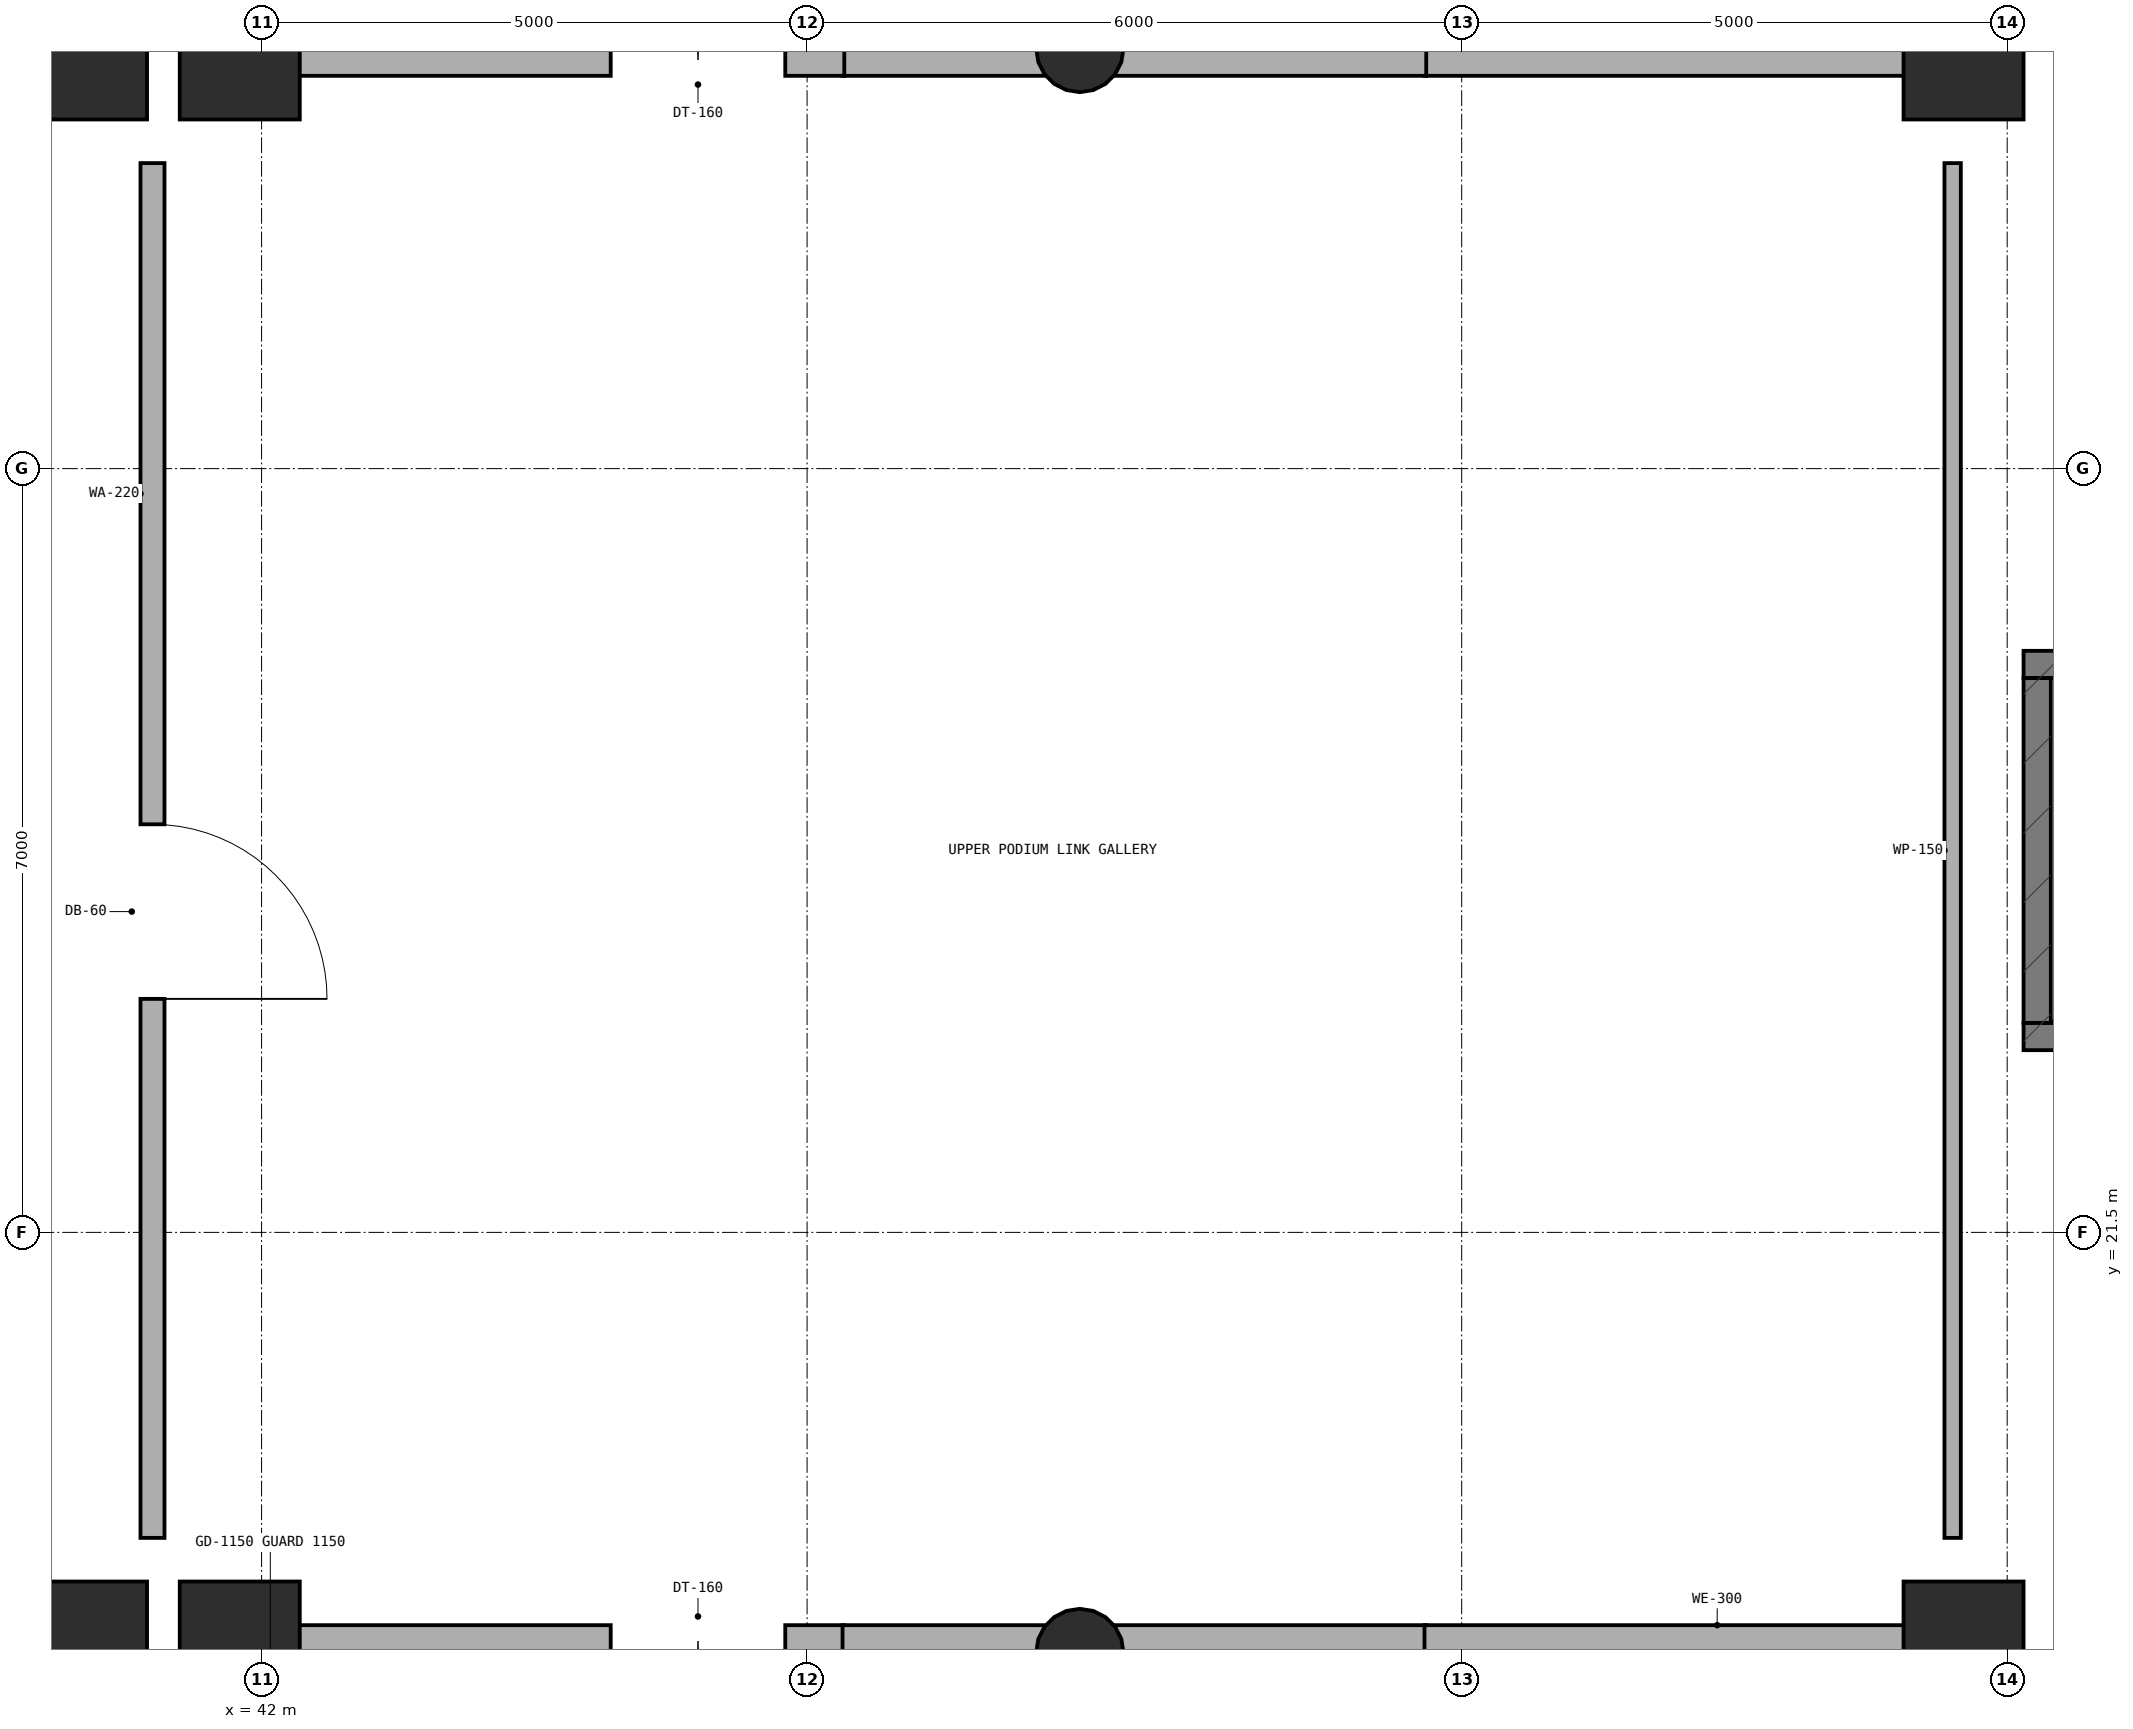
"""IFC4 building model, lengths in metres.
Left out: names, types, materials, properties, quantities, classifications, styles, units other than length and angle.
Written with IfcOpenShell. Run it as: python <this file> out.ifc"""

import sys

from ifc_helpers import new_model, si_unit, direction, frame, frame_2d, origin, origin_2d, place, context, subcontext, project, spatial, rectangle, circle, extrude, element, fill, save


model = new_model("IFC4")
c1 = context("Model", 3, precision=1e-05, world=origin(), true_north=direction((0.0, 1.0)))
c2 = subcontext(c1, "Body", "Model", "MODEL_VIEW")
j1 = project(units=[si_unit("LENGTHUNIT", "METRE"), si_unit("PLANEANGLEUNIT", "RADIAN")], contexts=[c1])
p1 = place(None, origin())
s1 = spatial("IfcSite", under=j1, at=p1, CompositionType="ELEMENT")
p2 = place(p1, origin())
s2 = spatial("IfcBuilding", under=s1, at=p2, CompositionType="ELEMENT")
p3 = place(p2, frame((0.0, 0.0, 19.5)))
s3 = spatial("IfcBuildingStorey", under=s2, at=p3, CompositionType="ELEMENT", Elevation=19.5)
for number, where, z_axis, x_axis in (
    (1, (58.15, 23.295, 0.0), (0.0, 0.0, 1.0), (1.0, 0.0, 0.0)),
    (2, (58.15, 26.705, 0.0), (0.0, 0.0, 1.0), (1.0, 0.0, 0.0)),
):
    element("IfcWall", number, at=place(p3, frame(where, z_axis=z_axis, x_axis=x_axis)), inside=s3, PredefinedType="STANDARD", context=c2, shape_type="SweptSolid", body=[
        extrude(rectangle(XDim=7.5, YDim=0.25, at=frame_2d((3.75, 0.0))), origin(), (0.0, 0.0, 1.0), 4.5),
    ])
p4 = place(p3, frame((58.275, 23.42, 0.0), z_axis=(0.0, 0.0, 1.0), x_axis=(0.0, 1.0, 0.0)))
e3 = element("IfcWall", 3, at=p4, inside=s3, PredefinedType="STANDARD", context=c2, shape_type="SweptSolid", body=[
    extrude(rectangle(XDim=3.16, YDim=0.25, at=frame_2d((1.58, 0.0))), origin(), (0.0, 0.0, 1.0), 4.5),
])
for number, where, z_axis, x_axis in (
    (4, (40.4, 17.65, 0.0), (0.0, 0.0, 1.0), (1.0, 0.0, 0.0)),
    (5, (40.4, 32.35, 0.0), (0.0, 0.0, 1.0), (1.0, 0.0, 0.0)),
    (6, (41.8, 17.65, 0.0), (0.0, 0.0, 1.0), (1.0, 0.0, 0.0)),
    (7, (41.8, 32.35, 0.0), (0.0, 0.0, 1.0), (1.0, 0.0, 0.0)),
):
    element("IfcColumn", number, at=place(p3, frame(where, z_axis=z_axis, x_axis=x_axis)), inside=s3, PredefinedType="COLUMN", context=c2, shape_type="SweptSolid", body=[
        extrude(rectangle(XDim=1.1, YDim=1.3, at=origin_2d()), origin(), (0.0, 0.0, 1.0), 4.5),
    ])
for number, where, z_axis, x_axis in (
    (8, (49.5, 17.65, 0.0), (0.0, 0.0, 1.0), (1.0, 0.0, 0.0)),
    (9, (49.5, 32.35, 0.0), (0.0, 0.0, 1.0), (1.0, 0.0, 0.0)),
):
    element("IfcColumn", number, at=place(p3, frame(where, z_axis=z_axis, x_axis=x_axis)), inside=s3, PredefinedType="COLUMN", context=c2, shape_type="SweptSolid", body=[
        extrude(circle(Radius=0.4, at=origin_2d()), origin(), (0.0, 0.0, 1.0), 4.5),
    ])
for number, where, z_axis, x_axis in (
    (10, (57.6, 17.65, 0.0), (0.0, 0.0, 1.0), (1.0, 0.0, 0.0)),
    (11, (57.6, 32.35, 0.0), (0.0, 0.0, 1.0), (1.0, 0.0, 0.0)),
):
    element("IfcColumn", number, at=place(p3, frame(where, z_axis=z_axis, x_axis=x_axis)), inside=s3, PredefinedType="COLUMN", context=c2, shape_type="SweptSolid", body=[
        extrude(rectangle(XDim=1.1, YDim=1.3, at=origin_2d()), origin(), (0.0, 0.0, 1.0), 4.5),
    ])
p5 = place(p3, frame((42.01, 17.75, 0.0), z_axis=(0.0, 0.0, 1.0), x_axis=(1.0, 0.0, 0.0)))
e12 = element("IfcWall", 12, at=p5, inside=s3, PredefinedType="STANDARD", context=c2, shape_type="SweptSolid", body=[
    extrude(rectangle(XDim=5.331, YDim=0.3, at=frame_2d((2.666, 0.0))), origin(), (0.0, 0.0, 1.0), 4.22),
])
p6 = place(p5, frame((3.19, 0.0, 0.0)))
e13 = element("IfcOpeningElement", 13, at=p6, cuts=e12, PredefinedType="OPENING", context=c2, shape_type="SweptSolid", body=[
    extrude(rectangle(XDim=1.6, YDim=2.2, at=frame_2d((0.8, 1.1))), frame((0.0, 0.16, 0.0), z_axis=(0.0, -1.0, 0.0), x_axis=(1.0, 0.0, 0.0)), (0.0, 0.0, 1.0), 0.32),
])
p7 = place(p3, frame((47.325, 17.75, 0.0), z_axis=(0.0, 0.0, 1.0), x_axis=(1.0, 0.0, 0.0)))
e14 = element("IfcWall", 14, at=p7, inside=s3, PredefinedType="STANDARD", context=c2, shape_type="SweptSolid", body=[
    extrude(rectangle(XDim=5.35, YDim=0.3, at=frame_2d((2.675, 0.0))), origin(), (0.0, 0.0, 1.0), 4.22),
])
p8 = place(p3, frame((52.659, 17.75, 0.0), z_axis=(0.0, 0.0, 1.0), x_axis=(1.0, 0.0, 0.0)))
e15 = element("IfcWall", 15, at=p8, inside=s3, PredefinedType="STANDARD", context=c2, shape_type="SweptSolid", body=[
    extrude(rectangle(XDim=5.366, YDim=0.3, at=frame_2d((2.683, 0.0))), origin(), (0.0, 0.0, 1.0), 4.22),
])
p9 = place(p3, frame((57.99, 32.25, 0.0), z_axis=(0.0, 0.0, 1.0), x_axis=(-1.0, 0.0, 0.0)))
e16 = element("IfcWall", 16, at=p9, inside=s3, PredefinedType="STANDARD", context=c2, shape_type="SweptSolid", body=[
    extrude(rectangle(XDim=5.331, YDim=0.3, at=frame_2d((2.666, 0.0))), origin(), (0.0, 0.0, 1.0), 4.22),
])
p10 = place(p3, frame((52.675, 32.25, 0.0), z_axis=(0.0, 0.0, 1.0), x_axis=(-1.0, 0.0, 0.0)))
e17 = element("IfcWall", 17, at=p10, inside=s3, PredefinedType="STANDARD", context=c2, shape_type="SweptSolid", body=[
    extrude(rectangle(XDim=5.35, YDim=0.3, at=frame_2d((2.675, 0.0))), origin(), (0.0, 0.0, 1.0), 4.22),
])
p11 = place(p3, frame((47.341, 32.25, 0.0), z_axis=(0.0, 0.0, 1.0), x_axis=(-1.0, 0.0, 0.0)))
e18 = element("IfcWall", 18, at=p11, inside=s3, PredefinedType="STANDARD", context=c2, shape_type="SweptSolid", body=[
    extrude(rectangle(XDim=5.366, YDim=0.3, at=frame_2d((2.683, 0.0))), origin(), (0.0, 0.0, 1.0), 4.22),
])
p12 = place(p11, frame((0.541, 0.0, 0.0)))
e19 = element("IfcOpeningElement", 19, at=p12, cuts=e18, PredefinedType="OPENING", context=c2, shape_type="SweptSolid", body=[
    extrude(rectangle(XDim=1.6, YDim=2.2, at=frame_2d((0.8, 1.1))), frame((0.0, 0.16, 0.0), z_axis=(0.0, -1.0, 0.0), x_axis=(1.0, 0.0, 0.0)), (0.0, 0.0, 1.0), 0.32),
])
p13 = place(p3, frame((57.5, 18.7, 0.0), z_axis=(0.0, 0.0, 1.0), x_axis=(0.0, 1.0, 0.0)))
e20 = element("IfcWall", 20, at=p13, inside=s3, PredefinedType="PARTITIONING", context=c2, shape_type="SweptSolid", body=[
    extrude(rectangle(XDim=12.6, YDim=0.15, at=frame_2d((6.3, 0.0))), origin(), (0.0, 0.0, 1.0), 4.22),
])
p14 = place(p3, frame((41.0, 18.7, 0.0), z_axis=(0.0, 0.0, 1.0), x_axis=(0.0, 1.0, 0.0)))
e21 = element("IfcWall", 21, at=p14, inside=s3, PredefinedType="SOLIDWALL", context=c2, shape_type="SweptSolid", body=[
    extrude(rectangle(XDim=12.6, YDim=0.22, at=frame_2d((6.3, 0.0))), origin(), (0.0, 0.0, 1.0), 4.22),
])
p15 = place(p14, frame((4.94, 0.0, 0.0)))
e22 = element("IfcOpeningElement", 22, at=p15, cuts=e21, PredefinedType="OPENING", context=c2, shape_type="SweptSolid", body=[
    extrude(rectangle(XDim=1.6, YDim=2.15, at=frame_2d((0.8, 1.075))), frame((0.0, 0.12, 0.0), z_axis=(0.0, -1.0, 0.0), x_axis=(1.0, 0.0, 0.0)), (0.0, 0.0, 1.0), 0.24),
])
p16 = place(p6, frame((1.6, 0.0, 0.0), z_axis=(0.0, 0.0, 1.0), x_axis=(-1.0, 0.0, 0.0)))
e23 = element("IfcDoor", 23, at=p16, inside=s3, OperationType="DOUBLE_DOOR_SINGLE_SWING", PredefinedType="DOOR", context=c2, shape_type="SweptSolid", body=[
    extrude(rectangle(XDim=1.6, YDim=2.2, at=frame_2d((0.8, 1.1))), frame((0.0, 0.025, 0.0), z_axis=(0.0, -1.0, 0.0), x_axis=(1.0, 0.0, 0.0)), (0.0, 0.0, 1.0), 0.05),
])
fill(e13, e23)
p17 = place(p12, frame((1.6, 0.0, 0.0), z_axis=(0.0, 0.0, 1.0), x_axis=(-1.0, 0.0, 0.0)))
e24 = element("IfcDoor", 24, at=p17, inside=s3, OperationType="DOUBLE_DOOR_SINGLE_SWING", PredefinedType="DOOR", context=c2, shape_type="SweptSolid", body=[
    extrude(rectangle(XDim=1.6, YDim=2.2, at=frame_2d((0.8, 1.1))), frame((0.0, 0.025, 0.0), z_axis=(0.0, -1.0, 0.0), x_axis=(1.0, 0.0, 0.0)), (0.0, 0.0, 1.0), 0.05),
])
fill(e19, e24)
p18 = place(p15, frame((1.6, 0.0, 0.0), z_axis=(0.0, 0.0, 1.0), x_axis=(-1.0, 0.0, 0.0)))
e25 = element("IfcDoor", 25, at=p18, inside=s3, OperationType="SINGLE_SWING_RIGHT", PredefinedType="DOOR", context=c2, shape_type="SweptSolid", body=[
    extrude(rectangle(XDim=1.6, YDim=2.15, at=frame_2d((0.8, 1.075))), frame((0.0, 0.025, 0.0), z_axis=(0.0, -1.0, 0.0), x_axis=(1.0, 0.0, 0.0)), (0.0, 0.0, 1.0), 0.05),
])
fill(e22, e25)
save(model, sys.argv[1])
